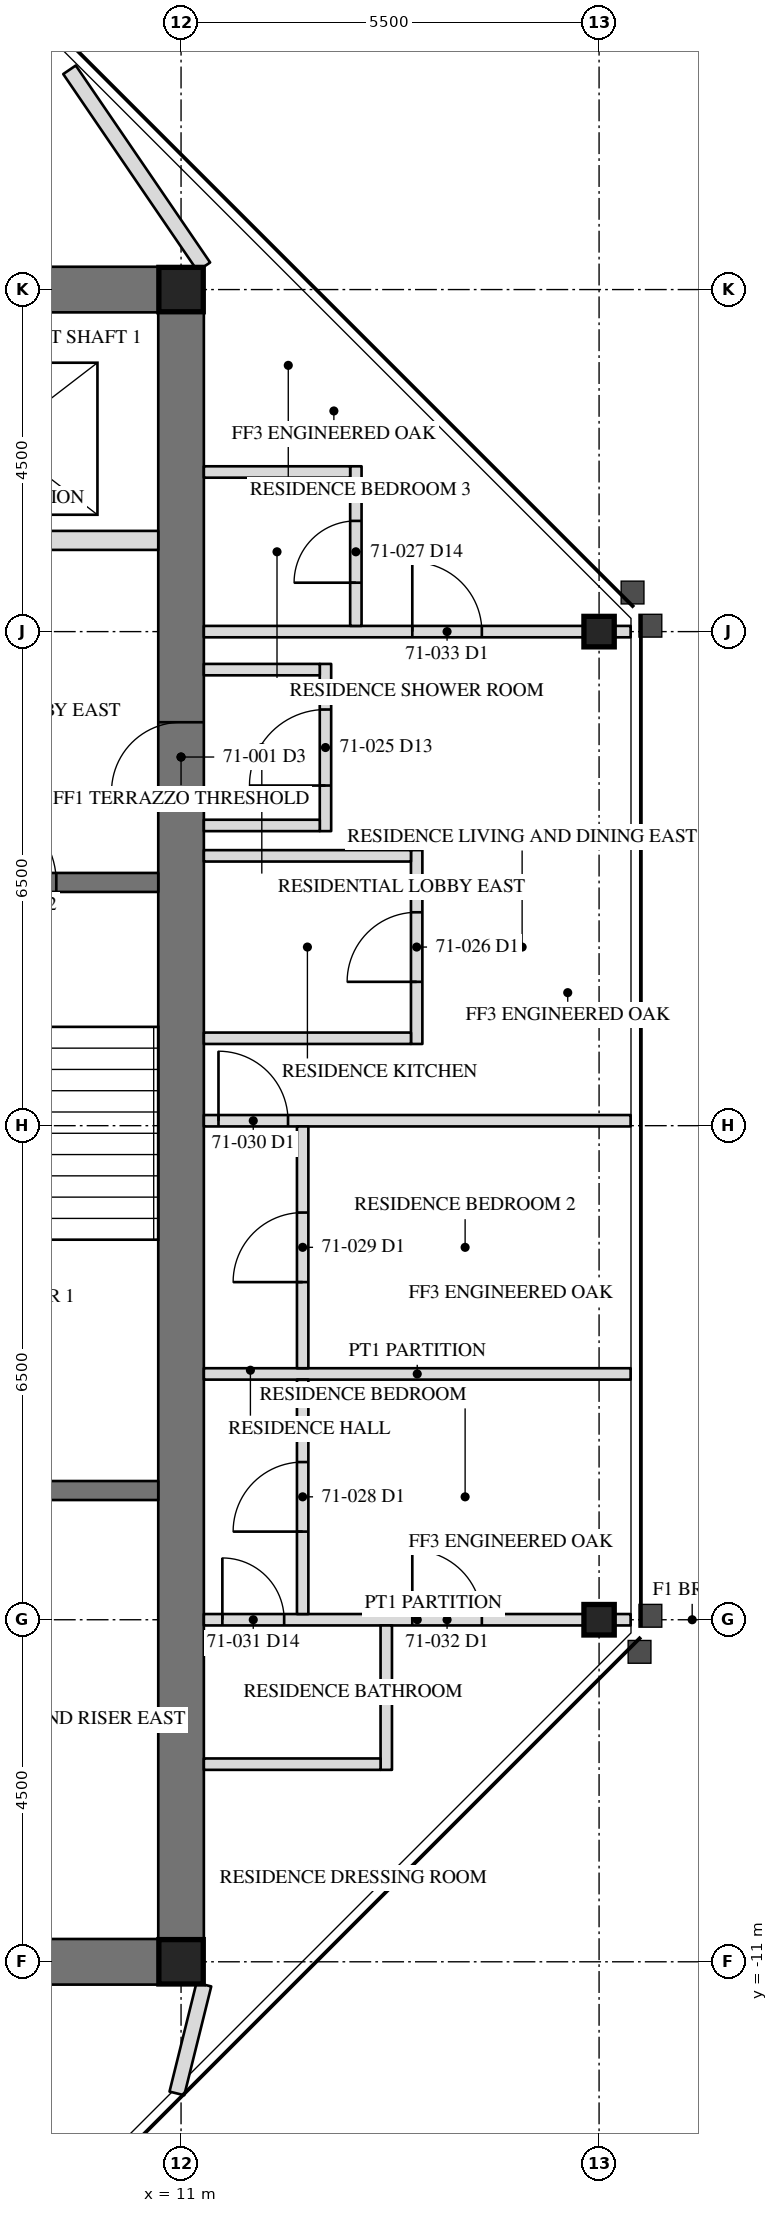
"""IFC4 building model, lengths in metres.
Left out: names, types, materials, properties, quantities, classifications, styles, units other than length and angle.
Written with IfcOpenShell. Run it as: python <this file> out.ifc"""

import sys

from ifc_helpers import new_model, si_unit, direction, frame, frame_2d, origin, origin_2d, place, context, subcontext, project, spatial, rectangle, hollow_rectangle, i_section, extrude, element, fill, save


model = new_model("IFC4")
c1 = context("Model", 3, precision=1e-05, world=origin(), true_north=direction((0.0, 1.0)))
c2 = subcontext(c1, "Body", "Model", "MODEL_VIEW")
j1 = project(units=[si_unit("LENGTHUNIT", "METRE"), si_unit("PLANEANGLEUNIT", "RADIAN")], contexts=[c1])
p1 = place(None, origin())
s1 = spatial("IfcSite", under=j1, at=p1, CompositionType="ELEMENT")
p2 = place(p1, origin())
s2 = spatial("IfcBuilding", under=s1, at=p2, CompositionType="ELEMENT")
p3 = place(p2, frame((0.0, 0.0, 288.4)))
s3 = spatial("IfcBuildingStorey", under=s2, at=p3, CompositionType="ELEMENT", Elevation=288.4)
for number, where, z_axis, x_axis in (
    (1, (16.5, -6.5, 0.0), (0.0, 0.0, 1.0), (0.0, 1.0, 0.0)),
    (2, (16.5, 6.5, 0.0), (0.0, 0.0, 1.0), (0.0, 1.0, 0.0)),
):
    element("IfcColumn", number, at=place(p3, frame(where, z_axis=z_axis, x_axis=x_axis)), inside=s3, PredefinedType="COLUMN", context=c2, shape_type="SweptSolid", body=[
        extrude(i_section(OverallWidth=0.401, OverallDepth=0.399, WebThickness=0.025, FlangeThickness=0.04, at=origin_2d()), origin(), (0.0, 0.0, 1.0), 3.6),
    ])
p4 = place(p3, frame((11.0, -11.0, 0.0), z_axis=(0.0, 0.0, 1.0), x_axis=(0.0, 1.0, 0.0)))
e3 = element("IfcWall", 3, at=p4, inside=s3, PredefinedType="SHEAR", context=c2, shape_type="SweptSolid", body=[
    extrude(rectangle(XDim=22.0, YDim=0.6, at=frame_2d((11.0, 0.0))), origin(), (0.0, 0.0, 1.0), 3.6),
])
p5 = place(p4, frame((15.393, 0.0, 0.0)))
e4 = element("IfcOpeningElement", 4, at=p5, cuts=e3, PredefinedType="OPENING", context=c2, shape_type="SweptSolid", body=[
    extrude(rectangle(XDim=0.915, YDim=2.134, at=frame_2d((0.458, 1.067))), frame((0.0, 0.31, 0.0), z_axis=(0.0, -1.0, 0.0), x_axis=(1.0, 0.0, 0.0)), (0.0, 0.0, 1.0), 0.62),
])
for number, where, z_axis, x_axis in (
    (5, (11.0, 11.0, 0.0), (0.0, 0.0, 1.0), (-1.0, 0.0, 0.0)),
    (6, (6.5, -11.0, 0.0), (0.0, 0.0, 1.0), (1.0, 0.0, 0.0)),
):
    element("IfcWall", number, at=place(p3, frame(where, z_axis=z_axis, x_axis=x_axis)), inside=s3, PredefinedType="SHEAR", context=c2, shape_type="SweptSolid", body=[
        extrude(rectangle(XDim=4.5, YDim=0.6, at=frame_2d((2.25, 0.0))), origin(), (0.0, 0.0, 1.0), 3.6),
    ])
for number, where, z_axis, x_axis in (
    (7, (11.0, 11.0, 0.0), (0.0, 0.0, 1.0), (1.0, 0.0, 0.0)),
    (8, (11.0, -11.0, 0.0), (0.0, 0.0, 1.0), (1.0, 0.0, 0.0)),
):
    element("IfcColumn", number, at=place(p3, frame(where, z_axis=z_axis, x_axis=x_axis)), inside=s3, PredefinedType="COLUMN", context=c2, shape_type="SweptSolid", body=[
        extrude(hollow_rectangle(XDim=0.584, YDim=0.584, WallThickness=0.051, at=origin_2d()), origin(), (0.0, 0.0, 1.0), 3.6),
    ])
p6 = place(p3, frame((6.95, -4.8, 0.0), z_axis=(0.0, 0.0, 1.0), x_axis=(1.0, 0.0, 0.0)))
e9 = element("IfcWall", 9, at=p6, inside=s3, PredefinedType="SOLIDWALL", context=c2, shape_type="SweptSolid", body=[
    extrude(rectangle(XDim=3.75, YDim=0.25, at=frame_2d((1.875, 0.0))), origin(), (0.0, 0.0, 1.0), 3.41),
])
p7 = place(p3, frame((6.95, 3.2, 0.0), z_axis=(0.0, 0.0, 1.0), x_axis=(1.0, 0.0, 0.0)))
e10 = element("IfcWall", 10, at=p7, inside=s3, PredefinedType="SOLIDWALL", context=c2, shape_type="SweptSolid", body=[
    extrude(rectangle(XDim=3.75, YDim=0.25, at=frame_2d((1.875, 0.0))), origin(), (0.0, 0.0, 1.0), 3.41),
])
p8 = place(p7, frame((1.342, 0.0, 0.0)))
e11 = element("IfcOpeningElement", 11, at=p8, cuts=e10, PredefinedType="OPENING", context=c2, shape_type="SweptSolid", body=[
    extrude(rectangle(XDim=1.067, YDim=2.134, at=frame_2d((0.533, 1.067))), frame((0.0, 0.135, 0.0), z_axis=(0.0, -1.0, 0.0), x_axis=(1.0, 0.0, 0.0)), (0.0, 0.0, 1.0), 0.27),
])
p9 = place(p3, frame((6.95, 7.7, 0.0), z_axis=(0.0, 0.0, 1.0), x_axis=(1.0, 0.0, 0.0)))
e12 = element("IfcWall", 12, at=p9, inside=s3, PredefinedType="PARTITIONING", context=c2, shape_type="SweptSolid", body=[
    extrude(rectangle(XDim=3.75, YDim=0.25, at=frame_2d((1.875, 0.0))), origin(), (0.0, 0.0, 1.0), 3.41),
])
p10 = place(p9, frame((0.45, 0.0, 0.0)))
e13 = element("IfcOpeningElement", 13, at=p10, cuts=e12, PredefinedType="OPENING", context=c2, shape_type="SweptSolid", body=[
    extrude(rectangle(XDim=1.219, YDim=2.134, at=frame_2d((0.609, 1.067))), frame((0.0, 0.135, 0.0), z_axis=(0.0, -1.0, 0.0), x_axis=(1.0, 0.0, 0.0)), (0.0, 0.0, 1.0), 0.27),
])
p11 = place(p3, frame((11.3, 11.3, 0.0), z_axis=(0.0, 0.0, 1.0), x_axis=(-0.563469639691, 0.826136771453, 0.0)))
e14 = element("IfcWall", 14, at=p11, inside=s3, PredefinedType="PARTITIONING", context=c2, shape_type="SweptSolid", body=[
    extrude(rectangle(XDim=3.137, YDim=0.2, at=frame_2d((1.568, 0.0))), origin(), (0.0, 0.0, 1.0), 2.704),
])
p12 = place(p3, frame((11.3, -11.3, 0.0), z_axis=(0.0, 0.0, 1.0), x_axis=(-0.24050983258, -0.970646702169, 0.0)))
e15 = element("IfcWall", 15, at=p12, inside=s3, PredefinedType="PARTITIONING", context=c2, shape_type="SweptSolid", body=[
    extrude(rectangle(XDim=1.475, YDim=0.2, at=frame_2d((0.737, 0.0))), origin(), (0.0, 0.0, 1.0), 3.41),
])
p13 = place(p3, frame((11.3, -6.5, 0.0), z_axis=(0.0, 0.0, 1.0), x_axis=(1.0, 0.0, 0.0)))
e16 = element("IfcWall", 16, at=p13, inside=s3, PredefinedType="PARTITIONING", context=c2, shape_type="SweptSolid", body=[
    extrude(rectangle(XDim=5.615, YDim=0.15, at=frame_2d((2.808, 0.0))), origin(), (0.0, 0.0, 1.0), 2.966),
])
p14 = place(p13, frame((0.243, 0.0, 0.0)))
e17 = element("IfcOpeningElement", 17, at=p14, cuts=e16, PredefinedType="OPENING", context=c2, shape_type="SweptSolid", body=[
    extrude(rectangle(XDim=0.813, YDim=2.032, at=frame_2d((0.406, 1.016))), frame((0.0, 0.085, 0.0), z_axis=(0.0, -1.0, 0.0), x_axis=(1.0, 0.0, 0.0)), (0.0, 0.0, 1.0), 0.17),
])
p15 = place(p13, frame((2.742, 0.0, 0.0)))
e18 = element("IfcOpeningElement", 18, at=p15, cuts=e16, PredefinedType="OPENING", context=c2, shape_type="SweptSolid", body=[
    extrude(rectangle(XDim=0.915, YDim=2.134, at=frame_2d((0.458, 1.067))), frame((0.0, 0.085, 0.0), z_axis=(0.0, -1.0, 0.0), x_axis=(1.0, 0.0, 0.0)), (0.0, 0.0, 1.0), 0.17),
])
p16 = place(p3, frame((11.3, -3.266, 0.0), z_axis=(0.0, 0.0, 1.0), x_axis=(1.0, 0.0, 0.0)))
e19 = element("IfcWall", 19, at=p16, inside=s3, PredefinedType="PARTITIONING", context=c2, shape_type="SweptSolid", body=[
    extrude(rectangle(XDim=5.615, YDim=0.15, at=frame_2d((2.808, 0.0))), origin(), (0.0, 0.0, 1.0), 2.709),
])
p17 = place(p3, frame((11.3, 0.065, 0.0), z_axis=(0.0, 0.0, 1.0), x_axis=(1.0, 0.0, 0.0)))
e20 = element("IfcWall", 20, at=p17, inside=s3, PredefinedType="PARTITIONING", context=c2, shape_type="SweptSolid", body=[
    extrude(rectangle(XDim=5.615, YDim=0.15, at=frame_2d((2.808, 0.0))), origin(), (0.0, 0.0, 1.0), 2.709),
])
p18 = place(p17, frame((0.192, 0.0, 0.0)))
e21 = element("IfcOpeningElement", 21, at=p18, cuts=e20, PredefinedType="OPENING", context=c2, shape_type="SweptSolid", body=[
    extrude(rectangle(XDim=0.915, YDim=2.134, at=frame_2d((0.458, 1.067))), frame((0.0, 0.085, 0.0), z_axis=(0.0, -1.0, 0.0), x_axis=(1.0, 0.0, 0.0)), (0.0, 0.0, 1.0), 0.17),
])
p19 = place(p3, frame((11.3, 6.5, 0.0), z_axis=(0.0, 0.0, 1.0), x_axis=(1.0, 0.0, 0.0)))
e22 = element("IfcWall", 22, at=p19, inside=s3, PredefinedType="PARTITIONING", context=c2, shape_type="SweptSolid", body=[
    extrude(rectangle(XDim=5.615, YDim=0.15, at=frame_2d((2.808, 0.0))), origin(), (0.0, 0.0, 1.0), 2.966),
])
p20 = place(p19, frame((2.742, 0.0, 0.0)))
e23 = element("IfcOpeningElement", 23, at=p20, cuts=e22, PredefinedType="OPENING", context=c2, shape_type="SweptSolid", body=[
    extrude(rectangle(XDim=0.915, YDim=2.134, at=frame_2d((0.458, 1.067))), frame((0.0, 0.085, 0.0), z_axis=(0.0, -1.0, 0.0), x_axis=(1.0, 0.0, 0.0)), (0.0, 0.0, 1.0), 0.17),
])
p21 = place(p3, frame((12.9, 3.875, 0.0), z_axis=(0.0, 0.0, 1.0), x_axis=(0.0, 1.0, 0.0)))
e24 = element("IfcWall", 24, at=p21, inside=s3, PredefinedType="PARTITIONING", context=c2, shape_type="SweptSolid", body=[
    extrude(rectangle(XDim=2.2, YDim=0.15, at=frame_2d((1.1, 0.0))), origin(), (0.0, 0.0, 1.0), 3.41),
])
p22 = place(p21, frame((0.6, 0.0, 0.0)))
e25 = element("IfcOpeningElement", 25, at=p22, cuts=e24, PredefinedType="OPENING", context=c2, shape_type="SweptSolid", body=[
    extrude(rectangle(XDim=1.0, YDim=2.134, at=frame_2d((0.5, 1.067))), frame((0.0, 0.085, 0.0), z_axis=(0.0, -1.0, 0.0), x_axis=(1.0, 0.0, 0.0)), (0.0, 0.0, 1.0), 0.17),
])
for number, where, z_axis, x_axis in (
    (26, (11.3, 3.95, 0.0), (0.0, 0.0, 1.0), (1.0, 0.0, 0.0)),
    (27, (11.3, 6.0, 0.0), (0.0, 0.0, 1.0), (1.0, 0.0, 0.0)),
):
    element("IfcWall", number, at=place(p3, frame(where, z_axis=z_axis, x_axis=x_axis)), inside=s3, PredefinedType="PARTITIONING", context=c2, shape_type="SweptSolid", body=[
        extrude(rectangle(XDim=1.525, YDim=0.15, at=frame_2d((0.762, 0.0))), origin(), (0.0, 0.0, 1.0), 3.41),
    ])
p23 = place(p3, frame((14.1, 1.075, 0.0), z_axis=(0.0, 0.0, 1.0), x_axis=(0.0, 1.0, 0.0)))
e28 = element("IfcWall", 28, at=p23, inside=s3, PredefinedType="PARTITIONING", context=c2, shape_type="SweptSolid", body=[
    extrude(rectangle(XDim=2.55, YDim=0.15, at=frame_2d((1.275, 0.0))), origin(), (0.0, 0.0, 1.0), 3.41),
])
p24 = place(p23, frame((0.817, 0.0, 0.0)))
e29 = element("IfcOpeningElement", 29, at=p24, cuts=e28, PredefinedType="OPENING", context=c2, shape_type="SweptSolid", body=[
    extrude(rectangle(XDim=0.915, YDim=2.134, at=frame_2d((0.458, 1.067))), frame((0.0, 0.085, 0.0), z_axis=(0.0, -1.0, 0.0), x_axis=(1.0, 0.0, 0.0)), (0.0, 0.0, 1.0), 0.17),
])
for number, where, z_axis, x_axis in (
    (30, (11.3, 1.15, 0.0), (0.0, 0.0, 1.0), (1.0, 0.0, 0.0)),
    (31, (11.3, 3.55, 0.0), (0.0, 0.0, 1.0), (1.0, 0.0, 0.0)),
):
    element("IfcWall", number, at=place(p3, frame(where, z_axis=z_axis, x_axis=x_axis)), inside=s3, PredefinedType="PARTITIONING", context=c2, shape_type="SweptSolid", body=[
        extrude(rectangle(XDim=2.725, YDim=0.15, at=frame_2d((1.362, 0.0))), origin(), (0.0, 0.0, 1.0), 3.41),
    ])
p25 = place(p3, frame((13.3, 6.575, 0.0), z_axis=(0.0, 0.0, 1.0), x_axis=(0.0, 1.0, 0.0)))
e32 = element("IfcWall", 32, at=p25, inside=s3, PredefinedType="PARTITIONING", context=c2, shape_type="SweptSolid", body=[
    extrude(rectangle(XDim=2.1, YDim=0.15, at=frame_2d((1.05, 0.0))), origin(), (0.0, 0.0, 1.0), 3.41),
])
p26 = place(p25, frame((0.569, 0.0, 0.0)))
e33 = element("IfcOpeningElement", 33, at=p26, cuts=e32, PredefinedType="OPENING", context=c2, shape_type="SweptSolid", body=[
    extrude(rectangle(XDim=0.813, YDim=2.032, at=frame_2d((0.406, 1.016))), frame((0.0, 0.085, 0.0), z_axis=(0.0, -1.0, 0.0), x_axis=(1.0, 0.0, 0.0)), (0.0, 0.0, 1.0), 0.17),
])
p27 = place(p3, frame((11.3, 8.6, 0.0), z_axis=(0.0, 0.0, 1.0), x_axis=(1.0, 0.0, 0.0)))
e34 = element("IfcWall", 34, at=p27, inside=s3, PredefinedType="PARTITIONING", context=c2, shape_type="SweptSolid", body=[
    extrude(rectangle(XDim=1.925, YDim=0.15, at=frame_2d((0.962, 0.0))), origin(), (0.0, 0.0, 1.0), 3.41),
])
p28 = place(p3, frame((12.6, -6.425, 0.0), z_axis=(0.0, 0.0, 1.0), x_axis=(0.0, 1.0, 0.0)))
e35 = element("IfcWall", 35, at=p28, inside=s3, PredefinedType="PARTITIONING", context=c2, shape_type="SweptSolid", body=[
    extrude(rectangle(XDim=3.084, YDim=0.15, at=frame_2d((1.542, 0.0))), origin(), (0.0, 0.0, 1.0), 3.41),
])
p29 = place(p28, frame((1.084, 0.0, 0.0)))
e36 = element("IfcOpeningElement", 36, at=p29, cuts=e35, PredefinedType="OPENING", context=c2, shape_type="SweptSolid", body=[
    extrude(rectangle(XDim=0.915, YDim=2.134, at=frame_2d((0.458, 1.067))), frame((0.0, 0.085, 0.0), z_axis=(0.0, -1.0, 0.0), x_axis=(1.0, 0.0, 0.0)), (0.0, 0.0, 1.0), 0.17),
])
p30 = place(p3, frame((12.6, -3.191, 0.0), z_axis=(0.0, 0.0, 1.0), x_axis=(0.0, 1.0, 0.0)))
e37 = element("IfcWall", 37, at=p30, inside=s3, PredefinedType="PARTITIONING", context=c2, shape_type="SweptSolid", body=[
    extrude(rectangle(XDim=3.181, YDim=0.15, at=frame_2d((1.59, 0.0))), origin(), (0.0, 0.0, 1.0), 3.41),
])
p31 = place(p30, frame((1.133, 0.0, 0.0)))
e38 = element("IfcOpeningElement", 38, at=p31, cuts=e37, PredefinedType="OPENING", context=c2, shape_type="SweptSolid", body=[
    extrude(rectangle(XDim=0.915, YDim=2.134, at=frame_2d((0.458, 1.067))), frame((0.0, 0.085, 0.0), z_axis=(0.0, -1.0, 0.0), x_axis=(1.0, 0.0, 0.0)), (0.0, 0.0, 1.0), 0.17),
])
p32 = place(p3, frame((13.7, -6.575, 0.0), z_axis=(0.0, 0.0, 1.0), x_axis=(0.0, -1.0, 0.0)))
e39 = element("IfcWall", 39, at=p32, inside=s3, PredefinedType="PARTITIONING", context=c2, shape_type="SweptSolid", body=[
    extrude(rectangle(XDim=1.9, YDim=0.15, at=frame_2d((0.95, 0.0))), origin(), (0.0, 0.0, 1.0), 3.41),
])
p33 = place(p3, frame((11.3, -8.4, 0.0), z_axis=(0.0, 0.0, 1.0), x_axis=(1.0, 0.0, 0.0)))
e40 = element("IfcWall", 40, at=p33, inside=s3, PredefinedType="PARTITIONING", context=c2, shape_type="SweptSolid", body=[
    extrude(rectangle(XDim=2.325, YDim=0.15, at=frame_2d((1.163, 0.0))), origin(), (0.0, 0.0, 1.0), 3.41),
])
p34 = place(p5, origin())
e41 = element("IfcDoor", 41, at=p34, inside=s3, OperationType="SINGLE_SWING_RIGHT", PredefinedType="DOOR", context=c2, shape_type="SweptSolid", body=[
    extrude(rectangle(XDim=0.915, YDim=2.134, at=frame_2d((0.458, 1.067))), frame((0.0, -0.225, 0.0), z_axis=(0.0, -1.0, 0.0), x_axis=(1.0, 0.0, 0.0)), (0.0, 0.0, 1.0), 0.05),
])
fill(e4, e41)
p35 = place(p8, origin())
e42 = element("IfcDoor", 42, at=p35, inside=s3, OperationType="SINGLE_SWING_LEFT", PredefinedType="DOOR", context=c2, shape_type="SweptSolid", body=[
    extrude(rectangle(XDim=1.067, YDim=2.134, at=frame_2d((0.533, 1.067))), frame((0.0, 0.025, 0.0), z_axis=(0.0, -1.0, 0.0), x_axis=(1.0, 0.0, 0.0)), (0.0, 0.0, 1.0), 0.05),
])
fill(e11, e42)
p36 = place(p22, origin())
e43 = element("IfcDoor", 43, at=p36, inside=s3, OperationType="SINGLE_SWING_RIGHT", PredefinedType="DOOR", context=c2, shape_type="SweptSolid", body=[
    extrude(rectangle(XDim=1.0, YDim=2.134, at=frame_2d((0.5, 1.067))), frame((0.0, 0.025, 0.0), z_axis=(0.0, -1.0, 0.0), x_axis=(1.0, 0.0, 0.0)), (0.0, 0.0, 1.0), 0.05),
])
fill(e25, e43)
p37 = place(p24, origin())
e44 = element("IfcDoor", 44, at=p37, inside=s3, OperationType="SINGLE_SWING_LEFT", PredefinedType="DOOR", context=c2, shape_type="SweptSolid", body=[
    extrude(rectangle(XDim=0.915, YDim=2.134, at=frame_2d((0.458, 1.067))), frame((0.0, 0.025, 0.0), z_axis=(0.0, -1.0, 0.0), x_axis=(1.0, 0.0, 0.0)), (0.0, 0.0, 1.0), 0.05),
])
fill(e29, e44)
p38 = place(p26, origin())
e45 = element("IfcDoor", 45, at=p38, inside=s3, OperationType="SINGLE_SWING_LEFT", PredefinedType="DOOR", context=c2, shape_type="SweptSolid", body=[
    extrude(rectangle(XDim=0.813, YDim=2.032, at=frame_2d((0.406, 1.016))), frame((0.0, 0.025, 0.0), z_axis=(0.0, -1.0, 0.0), x_axis=(1.0, 0.0, 0.0)), (0.0, 0.0, 1.0), 0.05),
])
fill(e33, e45)
p39 = place(p29, origin())
e46 = element("IfcDoor", 46, at=p39, inside=s3, OperationType="SINGLE_SWING_LEFT", PredefinedType="DOOR", context=c2, shape_type="SweptSolid", body=[
    extrude(rectangle(XDim=0.915, YDim=2.134, at=frame_2d((0.458, 1.067))), frame((0.0, 0.025, 0.0), z_axis=(0.0, -1.0, 0.0), x_axis=(1.0, 0.0, 0.0)), (0.0, 0.0, 1.0), 0.05),
])
fill(e36, e46)
p40 = place(p31, origin())
e47 = element("IfcDoor", 47, at=p40, inside=s3, OperationType="SINGLE_SWING_LEFT", PredefinedType="DOOR", context=c2, shape_type="SweptSolid", body=[
    extrude(rectangle(XDim=0.915, YDim=2.134, at=frame_2d((0.458, 1.067))), frame((0.0, 0.025, 0.0), z_axis=(0.0, -1.0, 0.0), x_axis=(1.0, 0.0, 0.0)), (0.0, 0.0, 1.0), 0.05),
])
fill(e38, e47)
p41 = place(p18, origin())
e48 = element("IfcDoor", 48, at=p41, inside=s3, OperationType="SINGLE_SWING_LEFT", PredefinedType="DOOR", context=c2, shape_type="SweptSolid", body=[
    extrude(rectangle(XDim=0.915, YDim=2.134, at=frame_2d((0.458, 1.067))), frame((0.0, 0.025, 0.0), z_axis=(0.0, -1.0, 0.0), x_axis=(1.0, 0.0, 0.0)), (0.0, 0.0, 1.0), 0.05),
])
fill(e21, e48)
p42 = place(p14, origin())
e49 = element("IfcDoor", 49, at=p42, inside=s3, OperationType="SINGLE_SWING_LEFT", PredefinedType="DOOR", context=c2, shape_type="SweptSolid", body=[
    extrude(rectangle(XDim=0.813, YDim=2.032, at=frame_2d((0.406, 1.016))), frame((0.0, 0.025, 0.0), z_axis=(0.0, -1.0, 0.0), x_axis=(1.0, 0.0, 0.0)), (0.0, 0.0, 1.0), 0.05),
])
fill(e17, e49)
p43 = place(p15, origin())
e50 = element("IfcDoor", 50, at=p43, inside=s3, OperationType="SINGLE_SWING_LEFT", PredefinedType="DOOR", context=c2, shape_type="SweptSolid", body=[
    extrude(rectangle(XDim=0.915, YDim=2.134, at=frame_2d((0.458, 1.067))), frame((0.0, 0.025, 0.0), z_axis=(0.0, -1.0, 0.0), x_axis=(1.0, 0.0, 0.0)), (0.0, 0.0, 1.0), 0.05),
])
fill(e18, e50)
p44 = place(p20, origin())
e51 = element("IfcDoor", 51, at=p44, inside=s3, OperationType="SINGLE_SWING_LEFT", PredefinedType="DOOR", context=c2, shape_type="SweptSolid", body=[
    extrude(rectangle(XDim=0.915, YDim=2.134, at=frame_2d((0.458, 1.067))), frame((0.0, 0.025, 0.0), z_axis=(0.0, -1.0, 0.0), x_axis=(1.0, 0.0, 0.0)), (0.0, 0.0, 1.0), 0.05),
])
fill(e23, e51)
save(model, sys.argv[1])
